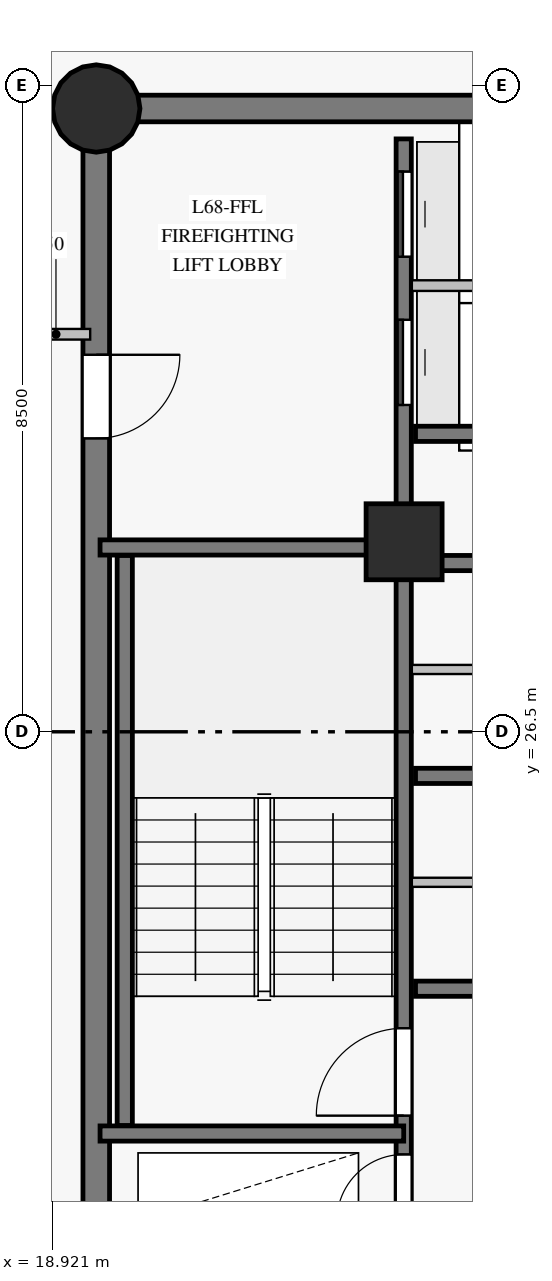
"""IFC4 building model, lengths in metres.
Left out: names, types, materials, properties, quantities, classifications, styles, units other than length and angle.
Written with IfcOpenShell. Run it as: python <this file> out.ifc"""

import sys

from ifc_helpers import new_model, si_unit, direction, frame, frame_2d, origin, origin_with_axes, origin_2d, place, context, subcontext, project, spatial, rectangle, circle, extrude, source, transform, mapped, element, fill, save


model = new_model("IFC4")
c1 = context("Model", 3, precision=1e-05, world=origin(), true_north=direction((0.0, 1.0)))
c2 = subcontext(c1, "Body", "Model", "MODEL_VIEW")
j1 = project(units=[si_unit("LENGTHUNIT", "METRE"), si_unit("PLANEANGLEUNIT", "RADIAN")], contexts=[c1])
p1 = place(None, origin())
s1 = spatial("IfcSite", under=j1, at=p1, CompositionType="ELEMENT")
p2 = place(p1, origin())
s2 = spatial("IfcBuilding", under=s1, at=p2, CompositionType="ELEMENT")
p3 = place(p2, frame((0.0, 0.0, 232.15)))
s3 = spatial("IfcBuildingStorey", under=s2, at=p3, CompositionType="ELEMENT", Elevation=232.15)
p4 = place(p3, frame((26.55, 34.7, 0.0), z_axis=(0.0, 0.0, 1.0), x_axis=(-1.0, 0.0, 0.0)))
e1 = element("IfcWall", 1, at=p4, inside=s3, PredefinedType="SHEAR", context=c2, shape_type="SweptSolid", body=[
    extrude(rectangle(XDim=7.05, YDim=0.35, at=frame_2d((3.525, 0.0))), origin(), (0.0, 0.0, 1.0), 2.85),
])
p5 = place(p3, frame((19.5, 34.7, 0.0), z_axis=(0.0, 0.0, 1.0), x_axis=(0.0, -1.0, 0.0)))
e2 = element("IfcWall", 2, at=p5, inside=s3, PredefinedType="SHEAR", context=c2, shape_type="SweptSolid", body=[
    extrude(rectangle(XDim=16.4, YDim=0.35, at=frame_2d((8.2, 0.0))), origin(), (0.0, 0.0, 1.0), 2.85),
])
p6 = place(p5, frame((3.24, 0.0, 0.0)))
e3 = element("IfcOpeningElement", 3, at=p6, cuts=e2, PredefinedType="OPENING", context=c2, shape_type="SweptSolid", body=[
    extrude(rectangle(XDim=1.1, YDim=2.15, at=frame_2d((0.55, 1.075))), frame((0.0, 0.185, 0.0), z_axis=(0.0, -1.0, 0.0), x_axis=(1.0, 0.0, 0.0)), (0.0, 0.0, 1.0), 0.37),
])
m1 = source(origin_with_axes(), c2, "Body", "SweptSolid", [
    extrude(circle(Radius=0.575, at=origin_2d()), origin(), (0.0, 0.0, 1.0), 3.05),
])
p7 = place(p3, frame((19.5, 34.7, 0.0), z_axis=(0.0, 0.0, 1.0), x_axis=(1.0, 0.0, 0.0)))
e4 = element("IfcColumn", 4, at=p7, inside=s3, PredefinedType="COLUMN", context=c2, shape_type="MappedRepresentation", body=[
    mapped(m1, transform((0.0, 0.0, 0.0), scale=1.0)),
])
m2 = source(origin_with_axes(), c2, "Body", "SweptSolid", [
    extrude(rectangle(XDim=1.0, YDim=1.0, at=origin_2d()), origin(), (0.0, 0.0, 1.0), 3.05),
])
p8 = place(p3, frame((23.55, 29.0, 0.0), z_axis=(0.0, 0.0, 1.0), x_axis=(1.0, 0.0, 0.0)))
e5 = element("IfcColumn", 5, at=p8, inside=s3, PredefinedType="COLUMN", context=c2, shape_type="MappedRepresentation", body=[
    mapped(m2, transform((0.0, 0.0, 0.0), scale=1.0)),
])
p9 = place(p3, frame((23.545, 18.7, 0.0), z_axis=(0.0, 0.0, 1.0), x_axis=(0.0, 1.0, 0.0)))
e6 = element("IfcWall", 6, at=p9, inside=s3, PredefinedType="SHEAR", context=c2, shape_type="SweptSolid", body=[
    extrude(rectangle(XDim=15.6, YDim=0.2, at=frame_2d((7.8, 0.0))), origin(), (0.0, 0.0, 1.0), 2.85),
])
p10 = place(p9, frame((2.75, 0.0, 0.0)))
e7 = element("IfcOpeningElement", 7, at=p10, cuts=e6, PredefinedType="OPENING", context=c2, shape_type="SweptSolid", body=[
    extrude(rectangle(XDim=1.15, YDim=2.15, at=frame_2d((0.575, 1.075))), frame((0.0, 0.11, 0.0), z_axis=(0.0, -1.0, 0.0), x_axis=(1.0, 0.0, 0.0)), (0.0, 0.0, 1.0), 0.22),
])
p11 = place(p9, frame((0.14, 0.0, 0.0)))
e8 = element("IfcOpeningElement", 8, at=p11, cuts=e6, PredefinedType="OPENING", context=c2, shape_type="SweptSolid", body=[
    extrude(rectangle(XDim=0.88, YDim=2.1, at=frame_2d((0.44, 1.05))), frame((0.0, 0.11, 0.0), z_axis=(0.0, -1.0, 0.0), x_axis=(1.0, 0.0, 0.0)), (0.0, 0.0, 1.0), 0.22),
])
p12 = place(p9, frame((1.36, 0.0, 0.0)))
e9 = element("IfcOpeningElement", 9, at=p12, cuts=e6, PredefinedType="OPENING", context=c2, shape_type="SweptSolid", body=[
    extrude(rectangle(XDim=0.88, YDim=2.1, at=frame_2d((0.44, 1.05))), frame((0.0, 0.11, 0.0), z_axis=(0.0, -1.0, 0.0), x_axis=(1.0, 0.0, 0.0)), (0.0, 0.0, 1.0), 0.22),
])
p13 = place(p9, frame((12.1, 0.0, 0.0)))
e10 = element("IfcOpeningElement", 10, at=p13, cuts=e6, PredefinedType="OPENING", context=c2, shape_type="SweptSolid", body=[
    extrude(rectangle(XDim=1.12, YDim=2.15, at=frame_2d((0.56, 1.075))), frame((0.0, 0.11, 0.0), z_axis=(0.0, -1.0, 0.0), x_axis=(1.0, 0.0, 0.0)), (0.0, 0.0, 1.0), 0.22),
])
p14 = place(p9, frame((14.05, 0.0, 0.0)))
e11 = element("IfcOpeningElement", 11, at=p14, cuts=e6, PredefinedType="OPENING", context=c2, shape_type="SweptSolid", body=[
    extrude(rectangle(XDim=1.12, YDim=2.15, at=frame_2d((0.56, 1.075))), frame((0.0, 0.11, 0.0), z_axis=(0.0, -1.0, 0.0), x_axis=(1.0, 0.0, 0.0)), (0.0, 0.0, 1.0), 0.22),
])
p15 = place(p3, frame((23.7, 23.12, 0.0), z_axis=(0.0, 0.0, 1.0), x_axis=(1.0, 0.0, 0.0)))
e12 = element("IfcWall", 12, at=p15, inside=s3, PredefinedType="SHEAR", context=c2, shape_type="SweptSolid", body=[
    extrude(rectangle(XDim=9.6, YDim=0.2, at=frame_2d((4.8, 0.0))), origin(), (0.0, 0.0, 1.0), 2.85),
])
p16 = place(p15, frame((2.4, 0.0, 0.0)))
e13 = element("IfcOpeningElement", 13, at=p16, cuts=e12, PredefinedType="OPENING", context=c2, shape_type="SweptSolid", body=[
    extrude(rectangle(XDim=1.0, YDim=2.15, at=frame_2d((0.5, 1.075))), frame((0.0, 0.11, 0.0), z_axis=(0.0, -1.0, 0.0), x_axis=(1.0, 0.0, 0.0)), (0.0, 0.0, 1.0), 0.22),
])
p17 = place(p3, frame((23.7, 25.92, 0.0), z_axis=(0.0, 0.0, 1.0), x_axis=(1.0, 0.0, 0.0)))
e14 = element("IfcWall", 14, at=p17, inside=s3, PredefinedType="SHEAR", context=c2, shape_type="SweptSolid", body=[
    extrude(rectangle(XDim=9.6, YDim=0.2, at=frame_2d((4.8, 0.0))), origin(), (0.0, 0.0, 1.0), 2.85),
])
p18 = place(p3, frame((23.7, 28.72, 0.0), z_axis=(0.0, 0.0, 1.0), x_axis=(1.0, 0.0, 0.0)))
e15 = element("IfcWall", 15, at=p18, inside=s3, PredefinedType="SHEAR", context=c2, shape_type="SweptSolid", body=[
    extrude(rectangle(XDim=9.6, YDim=0.2, at=frame_2d((4.8, 0.0))), origin(), (0.0, 0.0, 1.0), 2.85),
])
p19 = place(p18, frame((2.4, 0.0, 0.0)))
e16 = element("IfcOpeningElement", 16, at=p19, cuts=e15, PredefinedType="OPENING", context=c2, shape_type="SweptSolid", body=[
    extrude(rectangle(XDim=1.0, YDim=2.15, at=frame_2d((0.5, 1.075))), frame((0.0, 0.11, 0.0), z_axis=(0.0, -1.0, 0.0), x_axis=(1.0, 0.0, 0.0)), (0.0, 0.0, 1.0), 0.22),
])
p20 = place(p3, frame((19.875, 21.32, 0.0), z_axis=(0.0, 0.0, 1.0), x_axis=(0.0, 1.0, 0.0)))
e17 = element("IfcWall", 17, at=p20, inside=s3, PredefinedType="SHEAR", context=c2, shape_type="SweptSolid", body=[
    extrude(rectangle(XDim=7.5, YDim=0.2, at=frame_2d((3.75, 0.0))), origin(), (0.0, 0.0, 1.0), 2.85),
])
for number, where, z_axis, x_axis in (
    (18, (19.55, 21.215, 0.0), (0.0, 0.0, 1.0), (1.0, 0.0, 0.0)),
    (19, (19.55, 28.925, 0.0), (0.0, 0.0, 1.0), (1.0, 0.0, 0.0)),
):
    element("IfcWall", number, at=place(p3, frame(where, z_axis=z_axis, x_axis=x_axis)), inside=s3, PredefinedType="SHEAR", context=c2, shape_type="SweptSolid", body=[
        extrude(rectangle(XDim=3.995, YDim=0.2, at=frame_2d((1.998, 0.0))), origin(), (0.0, 0.0, 1.0), 2.85),
    ])
p21 = place(p3, frame((23.7, 30.42, 0.0), z_axis=(0.0, 0.0, 1.0), x_axis=(1.0, 0.0, 0.0)))
e20 = element("IfcWall", 20, at=p21, inside=s3, PredefinedType="SHEAR", context=c2, shape_type="SweptSolid", body=[
    extrude(rectangle(XDim=2.78, YDim=0.2, at=frame_2d((1.39, 0.0))), origin(), (0.0, 0.0, 1.0), 2.85),
])
p22 = place(p3, frame((23.652, 24.52, 0.0), z_axis=(0.0, 0.0, 1.0), x_axis=(1.0, 0.0, 0.0)))
e21 = element("IfcWall", 21, at=p22, inside=s3, PredefinedType="PARTITIONING", context=c2, shape_type="SweptSolid", body=[
    extrude(rectangle(XDim=9.698, YDim=0.12, at=frame_2d((4.849, 0.0))), origin(), (0.0, 0.0, 1.0), 2.85),
])
p23 = place(p22, frame((4.2, 0.0, 0.0)))
e22 = element("IfcOpeningElement", 22, at=p23, cuts=e21, PredefinedType="OPENING", context=c2, shape_type="SweptSolid", body=[
    extrude(rectangle(XDim=0.94, YDim=2.1, at=frame_2d((0.47, 1.05))), frame((0.0, 0.07, 0.0), z_axis=(0.0, -1.0, 0.0), x_axis=(1.0, 0.0, 0.0)), (0.0, 0.0, 1.0), 0.14),
])
p24 = place(p3, frame((23.652, 27.32, 0.0), z_axis=(0.0, 0.0, 1.0), x_axis=(1.0, 0.0, 0.0)))
e23 = element("IfcWall", 23, at=p24, inside=s3, PredefinedType="PARTITIONING", context=c2, shape_type="SweptSolid", body=[
    extrude(rectangle(XDim=9.698, YDim=0.12, at=frame_2d((4.849, 0.0))), origin(), (0.0, 0.0, 1.0), 2.85),
])
p25 = place(p24, frame((4.2, 0.0, 0.0)))
e24 = element("IfcOpeningElement", 24, at=p25, cuts=e23, PredefinedType="OPENING", context=c2, shape_type="SweptSolid", body=[
    extrude(rectangle(XDim=0.94, YDim=2.1, at=frame_2d((0.47, 1.05))), frame((0.0, 0.07, 0.0), z_axis=(0.0, -1.0, 0.0), x_axis=(1.0, 0.0, 0.0)), (0.0, 0.0, 1.0), 0.14),
])
p26 = place(p3, frame((23.652, 32.37, 0.0), z_axis=(0.0, 0.0, 1.0), x_axis=(1.0, 0.0, 0.0)))
e25 = element("IfcWall", 25, at=p26, inside=s3, PredefinedType="PARTITIONING", context=c2, shape_type="SweptSolid", body=[
    extrude(rectangle(XDim=2.828, YDim=0.14, at=frame_2d((1.414, 0.0))), origin(), (0.0, 0.0, 1.0), 2.85),
])
p27 = place(p3, frame((19.42, 31.73, 0.0), z_axis=(0.0, 0.0, 1.0), x_axis=(-1.0, 0.0, 0.0)))
e26 = element("IfcWall", 26, at=p27, inside=s3, PredefinedType="PARTITIONING", context=c2, shape_type="SweptSolid", body=[
    extrude(rectangle(XDim=2.75, YDim=0.14, at=frame_2d((1.375, 0.0))), origin(), (0.0, 0.0, 1.0), 2.85),
])
p28 = place(p27, frame((0.9, 0.0, 0.0)))
e27 = element("IfcOpeningElement", 27, at=p28, cuts=e26, PredefinedType="OPENING", context=c2, shape_type="SweptSolid", body=[
    extrude(rectangle(XDim=0.96, YDim=2.15, at=frame_2d((0.48, 1.075))), frame((0.0, 0.08, 0.0), z_axis=(0.0, -1.0, 0.0), x_axis=(1.0, 0.0, 0.0)), (0.0, 0.0, 1.0), 0.16),
])
m3 = source(origin_with_axes(), c2, "Body", "SweptSolid", [
    extrude(rectangle(XDim=1.15, YDim=2.15, at=frame_2d((0.575, 1.075))), frame((0.0, 0.025, 0.0), z_axis=(0.0, -1.0, 0.0), x_axis=(1.0, 0.0, 0.0)), (0.0, 0.0, 1.0), 0.05),
])
p29 = place(p10, origin())
e28 = element("IfcDoor", 28, at=p29, inside=s3, OperationType="SINGLE_SWING_LEFT", PredefinedType="DOOR", context=c2, shape_type="MappedRepresentation", body=[
    mapped(m3, transform((0.0, 0.0, 0.0), scale=1.0)),
])
fill(e7, e28)
m4 = source(origin_with_axes(), c2, "Body", "SweptSolid", [
    extrude(rectangle(XDim=1.1, YDim=2.15, at=frame_2d((0.55, 1.075))), frame((0.0, 0.025, 0.0), z_axis=(0.0, -1.0, 0.0), x_axis=(1.0, 0.0, 0.0)), (0.0, 0.0, 1.0), 0.05),
])
p30 = place(p6, origin())
e29 = element("IfcDoor", 29, at=p30, inside=s3, OperationType="SINGLE_SWING_LEFT", PredefinedType="DOOR", context=c2, shape_type="MappedRepresentation", body=[
    mapped(m4, transform((0.0, 0.0, 0.0), scale=1.0)),
])
fill(e3, e29)
m5 = source(origin_with_axes(), c2, "Body", "SweptSolid", [
    extrude(rectangle(XDim=0.88, YDim=2.1, at=frame_2d((0.44, 1.05))), frame((0.0, 0.025, 0.0), z_axis=(0.0, -1.0, 0.0), x_axis=(1.0, 0.0, 0.0)), (0.0, 0.0, 1.0), 0.05),
])
p31 = place(p12, origin())
e30 = element("IfcDoor", 30, at=p31, inside=s3, OperationType="SINGLE_SWING_LEFT", PredefinedType="DOOR", context=c2, shape_type="MappedRepresentation", body=[
    mapped(m5, transform((0.0, 0.0, 0.0), scale=1.0)),
])
fill(e9, e30)
m6 = source(origin_with_axes(), c2, "Body", "SweptSolid", [
    extrude(rectangle(XDim=1.12, YDim=2.15, at=frame_2d((0.56, 1.075))), frame((0.0, 0.025, 0.0), z_axis=(0.0, -1.0, 0.0), x_axis=(1.0, 0.0, 0.0)), (0.0, 0.0, 1.0), 0.05),
])
p32 = place(p13, origin())
e31 = element("IfcDoor", 31, at=p32, inside=s3, OperationType="SLIDING_TO_LEFT", PredefinedType="DOOR", context=c2, shape_type="MappedRepresentation", body=[
    mapped(m6, transform((0.0, 0.0, 0.0), scale=1.0)),
])
fill(e10, e31)
p33 = place(p14, origin())
e32 = element("IfcDoor", 32, at=p33, inside=s3, OperationType="SLIDING_TO_RIGHT", PredefinedType="DOOR", context=c2, shape_type="MappedRepresentation", body=[
    mapped(m6, transform((0.0, 0.0, 0.0), scale=1.0)),
])
fill(e11, e32)
save(model, sys.argv[1])
